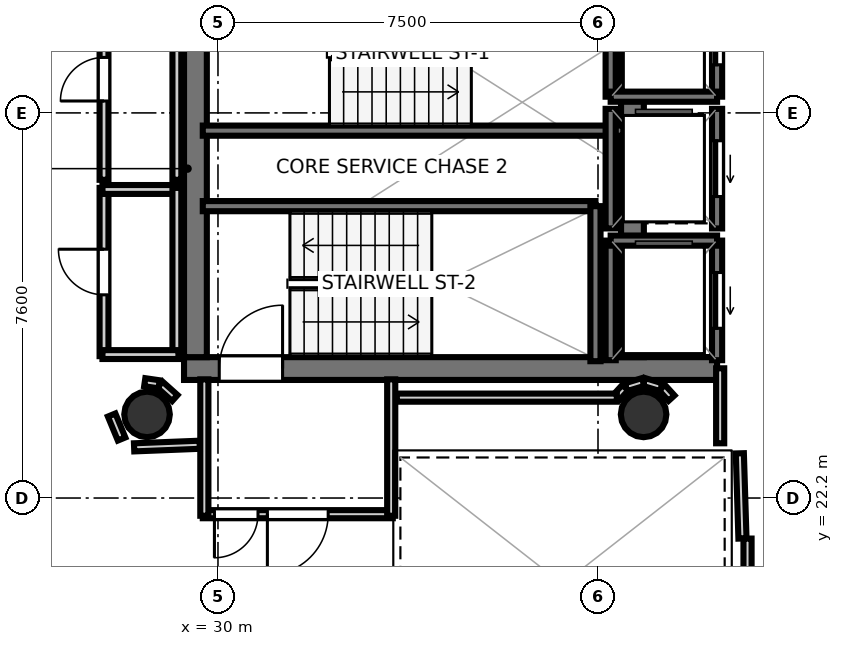
"""IFC4 building model, lengths in metres.
Left out: names, types, materials, properties, quantities, classifications, styles, units other than length and angle.
Written with IfcOpenShell. Run it as: python <this file> out.ifc"""

import sys

from ifc_helpers import new_model, si_unit, direction, frame, frame_2d, origin, origin_2d, place, context, subcontext, project, spatial, rectangle, hollow_circle, extrude, element, fill, save


model = new_model("IFC4")
c1 = context("Model", 3, precision=1e-05, world=origin(), true_north=direction((0.0, 1.0)))
c2 = subcontext(c1, "Body", "Model", "MODEL_VIEW")
j1 = project(units=[si_unit("LENGTHUNIT", "METRE"), si_unit("PLANEANGLEUNIT", "RADIAN")], contexts=[c1])
p1 = place(None, origin())
s1 = spatial("IfcSite", under=j1, at=p1, CompositionType="ELEMENT")
p2 = place(p1, origin())
s2 = spatial("IfcBuilding", under=s1, at=p2, CompositionType="ELEMENT")
p3 = place(p2, frame((0.0, 0.0, 295.4)))
s3 = spatial("IfcBuildingStorey", under=s2, at=p3, CompositionType="ELEMENT", Elevation=295.4)
p4 = place(p3, frame((29.33, 24.755, 0.0), z_axis=(0.0, 0.0, 1.0), x_axis=(1.0, 0.0, 0.0)))
e1 = element("IfcWall", 1, at=p4, inside=s3, PredefinedType="SHEAR", context=c2, shape_type="SweptSolid", body=[
    extrude(rectangle(XDim=10.52, YDim=0.45, at=frame_2d((5.26, 0.0))), origin(), (0.0, 0.0, 1.0), 3.52),
])
p5 = place(p4, frame((0.695, 0.0, 0.0)))
e2 = element("IfcOpeningElement", 2, at=p5, cuts=e1, PredefinedType="OPENING", context=c2, shape_type="SweptSolid", body=[
    extrude(rectangle(XDim=1.25, YDim=2.15, at=frame_2d((0.625, 1.075))), frame((0.0, 0.235, 0.0), z_axis=(0.0, -1.0, 0.0), x_axis=(1.0, 0.0, 0.0)), (0.0, 0.0, 1.0), 0.47),
])
for number, where, z_axis, x_axis in (
    (3, (29.555, 24.98, 0.0), (0.0, 0.0, 1.0), (0.0, 1.0, 0.0)),
    (4, (38.18, 24.98, 0.0), (0.0, 0.0, 1.0), (0.0, 1.0, 0.0)),
):
    element("IfcWall", number, at=place(p3, frame(where, z_axis=z_axis, x_axis=x_axis)), inside=s3, PredefinedType="SHEAR", context=c2, shape_type="SweptSolid", body=[
        extrude(rectangle(XDim=7.44, YDim=0.45, at=frame_2d((3.72, 0.0))), origin(), (0.0, 0.0, 1.0), 3.52),
    ])
for number, where, z_axis, x_axis in (
    (5, (28.6, 23.85, 0.0), (0.0, 0.0, 1.0), (1.0, 0.0, 0.0)),
    (6, (38.4, 23.85, 0.0), (0.0, 0.0, 1.0), (1.0, 0.0, 0.0)),
):
    element("IfcColumn", number, at=place(p3, frame(where, z_axis=z_axis, x_axis=x_axis)), inside=s3, PredefinedType="COLUMN", context=c2, shape_type="SweptSolid", body=[
        extrude(hollow_circle(Radius=0.45, WallThickness=0.025, at=origin_2d()), origin(), (0.0, 0.0, 1.0), 3.7),
    ])
p6 = place(p3, frame((29.7, 29.45, 0.0), z_axis=(0.0, 0.0, 1.0), x_axis=(1.0, 0.0, 0.0)))
e7 = element("IfcWall", 7, at=p6, inside=s3, PredefinedType="SOLIDWALL", context=c2, shape_type="SweptSolid", body=[
    extrude(rectangle(XDim=8.3, YDim=0.2, at=frame_2d((4.15, 0.0))), origin(), (0.0, 0.0, 1.0), 3.52),
])
p7 = place(p3, frame((29.7, 27.96, 0.0), z_axis=(0.0, 0.0, 1.0), x_axis=(1.0, 0.0, 0.0)))
e8 = element("IfcWall", 8, at=p7, inside=s3, PredefinedType="SOLIDWALL", context=c2, shape_type="SweptSolid", body=[
    extrude(rectangle(XDim=7.75, YDim=0.2, at=frame_2d((3.875, 0.0))), origin(), (0.0, 0.0, 1.0), 3.52),
])
p8 = place(p3, frame((37.45, 24.9, 0.0), z_axis=(0.0, 0.0, 1.0), x_axis=(0.0, 1.0, 0.0)))
e9 = element("IfcWall", 9, at=p8, inside=s3, PredefinedType="SOLIDWALL", context=c2, shape_type="SweptSolid", body=[
    extrude(rectangle(XDim=3.06, YDim=0.2, at=frame_2d((1.53, 0.0))), origin(), (0.0, 0.0, 1.0), 3.52),
])
p9 = place(p3, frame((39.85, 30.12, 0.0), z_axis=(0.0, 0.0, 1.0), x_axis=(0.0, 1.0, 0.0)))
e10 = element("IfcWall", 10, at=p9, inside=s3, PredefinedType="SOLIDWALL", context=c2, shape_type="SweptSolid", body=[
    extrude(rectangle(XDim=2.36, YDim=0.2, at=frame_2d((1.18, 0.0))), origin(), (0.0, 0.0, 1.0), 3.52),
])
p10 = place(p9, frame((0.63, 0.0, 0.0)))
e11 = element("IfcOpeningElement", 11, at=p10, cuts=e10, PredefinedType="OPENING", context=c2, shape_type="SweptSolid", body=[
    extrude(rectangle(XDim=1.1, YDim=2.15, at=frame_2d((0.55, 1.075))), frame((0.0, 0.11, 0.0), z_axis=(0.0, -1.0, 0.0), x_axis=(1.0, 0.0, 0.0)), (0.0, 0.0, 1.0), 0.22),
])
p11 = place(p3, frame((37.75, 30.12, 0.0), z_axis=(0.0, 0.0, 1.0), x_axis=(0.0, 1.0, 0.0)))
e12 = element("IfcWall", 12, at=p11, inside=s3, PredefinedType="SOLIDWALL", context=c2, shape_type="SweptSolid", body=[
    extrude(rectangle(XDim=2.36, YDim=0.2, at=frame_2d((1.18, 0.0))), origin(), (0.0, 0.0, 1.0), 3.52),
])
p12 = place(p3, frame((37.75, 30.12, 0.0), z_axis=(0.0, 0.0, 1.0), x_axis=(1.0, 0.0, 0.0)))
e13 = element("IfcWall", 13, at=p12, inside=s3, PredefinedType="SOLIDWALL", context=c2, shape_type="SweptSolid", body=[
    extrude(rectangle(XDim=2.1, YDim=0.2, at=frame_2d((1.05, 0.0))), origin(), (0.0, 0.0, 1.0), 3.52),
])
p13 = place(p3, frame((39.85, 24.92, 0.0), z_axis=(0.0, 0.0, 1.0), x_axis=(0.0, 1.0, 0.0)))
e14 = element("IfcWall", 14, at=p13, inside=s3, PredefinedType="SOLIDWALL", context=c2, shape_type="SweptSolid", body=[
    extrude(rectangle(XDim=2.36, YDim=0.2, at=frame_2d((1.18, 0.0))), origin(), (0.0, 0.0, 1.0), 3.52),
])
p14 = place(p13, frame((0.63, 0.0, 0.0)))
e15 = element("IfcOpeningElement", 15, at=p14, cuts=e14, PredefinedType="OPENING", context=c2, shape_type="SweptSolid", body=[
    extrude(rectangle(XDim=1.1, YDim=2.15, at=frame_2d((0.55, 1.075))), frame((0.0, 0.11, 0.0), z_axis=(0.0, -1.0, 0.0), x_axis=(1.0, 0.0, 0.0)), (0.0, 0.0, 1.0), 0.22),
])
p15 = place(p3, frame((37.75, 24.92, 0.0), z_axis=(0.0, 0.0, 1.0), x_axis=(0.0, 1.0, 0.0)))
e16 = element("IfcWall", 16, at=p15, inside=s3, PredefinedType="SOLIDWALL", context=c2, shape_type="SweptSolid", body=[
    extrude(rectangle(XDim=2.36, YDim=0.2, at=frame_2d((1.18, 0.0))), origin(), (0.0, 0.0, 1.0), 3.52),
])
p16 = place(p3, frame((37.75, 27.28, 0.0), z_axis=(0.0, 0.0, 1.0), x_axis=(1.0, 0.0, 0.0)))
e17 = element("IfcWall", 17, at=p16, inside=s3, PredefinedType="SOLIDWALL", context=c2, shape_type="SweptSolid", body=[
    extrude(rectangle(XDim=2.1, YDim=0.2, at=frame_2d((1.05, 0.0))), origin(), (0.0, 0.0, 1.0), 3.52),
])
p17 = place(p3, frame((39.85, 27.52, 0.0), z_axis=(0.0, 0.0, 1.0), x_axis=(0.0, 1.0, 0.0)))
e18 = element("IfcWall", 18, at=p17, inside=s3, PredefinedType="SOLIDWALL", context=c2, shape_type="SweptSolid", body=[
    extrude(rectangle(XDim=2.36, YDim=0.2, at=frame_2d((1.18, 0.0))), origin(), (0.0, 0.0, 1.0), 3.52),
])
p18 = place(p17, frame((0.63, 0.0, 0.0)))
e19 = element("IfcOpeningElement", 19, at=p18, cuts=e18, PredefinedType="OPENING", context=c2, shape_type="SweptSolid", body=[
    extrude(rectangle(XDim=1.1, YDim=2.15, at=frame_2d((0.55, 1.075))), frame((0.0, 0.11, 0.0), z_axis=(0.0, -1.0, 0.0), x_axis=(1.0, 0.0, 0.0)), (0.0, 0.0, 1.0), 0.22),
])
p19 = place(p3, frame((37.75, 27.52, 0.0), z_axis=(0.0, 0.0, 1.0), x_axis=(0.0, 1.0, 0.0)))
e20 = element("IfcWall", 20, at=p19, inside=s3, PredefinedType="SOLIDWALL", context=c2, shape_type="SweptSolid", body=[
    extrude(rectangle(XDim=2.36, YDim=0.2, at=frame_2d((1.18, 0.0))), origin(), (0.0, 0.0, 1.0), 3.52),
])
p20 = place(p3, frame((33.45, 21.881, 0.0), z_axis=(0.0, 0.0, 1.0), x_axis=(-1.0, 0.0, 0.0)))
e21 = element("IfcWall", 21, at=p20, inside=s3, PredefinedType="PARTITIONING", context=c2, shape_type="SweptSolid", body=[
    extrude(rectangle(XDim=3.75, YDim=0.16, at=frame_2d((1.875, 0.0))), origin(), (0.0, 0.0, 1.0), 2.84),
])
p21 = place(p20, frame((1.275, 0.0, 0.0)))
e22 = element("IfcOpeningElement", 22, at=p21, cuts=e21, PredefinedType="OPENING", context=c2, shape_type="SweptSolid", body=[
    extrude(rectangle(XDim=1.2, YDim=2.15, at=frame_2d((0.6, 1.075))), frame((0.0, 0.09, 0.0), z_axis=(0.0, -1.0, 0.0), x_axis=(1.0, 0.0, 0.0)), (0.0, 0.0, 1.0), 0.18),
])
p22 = place(p20, frame((2.66, 0.0, 0.0)))
e23 = element("IfcOpeningElement", 23, at=p22, cuts=e21, PredefinedType="OPENING", context=c2, shape_type="SweptSolid", body=[
    extrude(rectangle(XDim=0.86, YDim=2.05, at=frame_2d((0.43, 1.025))), frame((0.0, 0.09, 0.0), z_axis=(0.0, -1.0, 0.0), x_axis=(1.0, 0.0, 0.0)), (0.0, 0.0, 1.0), 0.18),
])
for number, where, z_axis, x_axis in (
    (24, (29.731, 21.85, 0.0), (0.0, 0.0, 1.0), (0.0, 1.0, 0.0)),
    (25, (33.419, 24.542, 0.0), (0.0, 0.0, 1.0), (0.0, -1.0, 0.0)),
):
    element("IfcWall", number, at=place(p3, frame(where, z_axis=z_axis, x_axis=x_axis)), inside=s3, PredefinedType="PARTITIONING", context=c2, shape_type="SweptSolid", body=[
        extrude(rectangle(XDim=2.692, YDim=0.16, at=frame_2d((1.346, 0.0))), origin(), (0.0, 0.0, 1.0), 2.84),
    ])
p23 = place(p3, frame((40.351, 21.401, 0.0), z_axis=(0.0, 0.0, 1.0), x_axis=(-0.031058045979, 0.999517582527, 0.0)))
e26 = element("IfcWall", 26, at=p23, inside=s3, PredefinedType="PARTITIONING", context=c2, shape_type="SweptSolid", body=[
    extrude(rectangle(XDim=1.682, YDim=0.16, at=frame_2d((0.841, 0.0))), origin(), (0.0, 0.0, 1.0), 2.84),
])
p24 = place(p3, frame((39.911, 23.28, 0.0), z_axis=(0.0, 0.0, 1.0), x_axis=(0.0, 1.0, 0.0)))
e27 = element("IfcWall", 27, at=p24, inside=s3, PredefinedType="PARTITIONING", context=c2, shape_type="SweptSolid", body=[
    extrude(rectangle(XDim=1.48, YDim=0.16, at=frame_2d((0.74, 0.0))), origin(), (0.0, 0.0, 1.0), 2.84),
])
p25 = place(p3, frame((40.451, 18.08, 0.0), z_axis=(0.0, 0.0, 1.0), x_axis=(0.0, 1.0, 0.0)))
e28 = element("IfcWall", 28, at=p25, inside=s3, PredefinedType="PARTITIONING", context=c2, shape_type="SweptSolid", body=[
    extrude(rectangle(XDim=3.32, YDim=0.16, at=frame_2d((1.66, 0.0))), origin(), (0.0, 0.0, 1.0), 2.84),
])
p26 = place(p3, frame((27.751, 25.0, 0.0), z_axis=(0.0, 0.0, 1.0), x_axis=(0.0, 1.0, 0.0)))
e29 = element("IfcWall", 29, at=p26, inside=s3, PredefinedType="PLUMBINGWALL", context=c2, shape_type="SweptSolid", body=[
    extrude(rectangle(XDim=3.32, YDim=0.175, at=frame_2d((1.66, 0.0))), origin(), (0.0, 0.0, 1.0), 2.84),
])
p27 = place(p26, frame((1.21, 0.0, 0.0)))
e30 = element("IfcOpeningElement", 30, at=p27, cuts=e29, PredefinedType="OPENING", context=c2, shape_type="SweptSolid", body=[
    extrude(rectangle(XDim=0.9, YDim=2.1, at=frame_2d((0.45, 1.05))), frame((0.0, 0.097, 0.0), z_axis=(0.0, -1.0, 0.0), x_axis=(1.0, 0.0, 0.0)), (0.0, 0.0, 1.0), 0.195),
])
p28 = place(p3, frame((27.72, 28.289, 0.0), z_axis=(0.0, 0.0, 1.0), x_axis=(1.0, 0.0, 0.0)))
e31 = element("IfcWall", 31, at=p28, inside=s3, PredefinedType="PLUMBINGWALL", context=c2, shape_type="SweptSolid", body=[
    extrude(rectangle(XDim=1.5, YDim=0.175, at=frame_2d((0.75, 0.0))), origin(), (0.0, 0.0, 1.0), 2.84),
])
p29 = place(p3, frame((29.189, 28.32, 0.0), z_axis=(0.0, 0.0, 1.0), x_axis=(0.0, -1.0, 0.0)))
e32 = element("IfcWall", 32, at=p29, inside=s3, PredefinedType="PLUMBINGWALL", context=c2, shape_type="SweptSolid", body=[
    extrude(rectangle(XDim=3.32, YDim=0.175, at=frame_2d((1.66, 0.0))), origin(), (0.0, 0.0, 1.0), 2.84),
])
p30 = place(p3, frame((29.22, 25.031, 0.0), z_axis=(0.0, 0.0, 1.0), x_axis=(-1.0, 0.0, 0.0)))
e33 = element("IfcWall", 33, at=p30, inside=s3, PredefinedType="PLUMBINGWALL", context=c2, shape_type="SweptSolid", body=[
    extrude(rectangle(XDim=1.5, YDim=0.175, at=frame_2d((0.75, 0.0))), origin(), (0.0, 0.0, 1.0), 2.84),
])
p31 = place(p3, frame((27.751, 28.48, 0.0), z_axis=(0.0, 0.0, 1.0), x_axis=(0.0, 1.0, 0.0)))
e34 = element("IfcWall", 34, at=p31, inside=s3, PredefinedType="PLUMBINGWALL", context=c2, shape_type="SweptSolid", body=[
    extrude(rectangle(XDim=3.97, YDim=0.175, at=frame_2d((1.985, 0.0))), origin(), (0.0, 0.0, 1.0), 2.84),
])
p32 = place(p31, frame((1.555, 0.0, 0.0)))
e35 = element("IfcOpeningElement", 35, at=p32, cuts=e34, PredefinedType="OPENING", context=c2, shape_type="SweptSolid", body=[
    extrude(rectangle(XDim=0.86, YDim=2.05, at=frame_2d((0.43, 1.025))), frame((0.0, 0.097, 0.0), z_axis=(0.0, -1.0, 0.0), x_axis=(1.0, 0.0, 0.0)), (0.0, 0.0, 1.0), 0.195),
])
p33 = place(p3, frame((29.189, 32.45, 0.0), z_axis=(0.0, 0.0, 1.0), x_axis=(0.0, -1.0, 0.0)))
e36 = element("IfcWall", 36, at=p33, inside=s3, PredefinedType="PLUMBINGWALL", context=c2, shape_type="SweptSolid", body=[
    extrude(rectangle(XDim=3.97, YDim=0.175, at=frame_2d((1.985, 0.0))), origin(), (0.0, 0.0, 1.0), 2.84),
])
p34 = place(p3, frame((38.951, 24.171, 0.0), z_axis=(0.0, 0.0, 1.0), x_axis=(-0.674186852077, 0.738560822469, 0.0)))
e37 = element("IfcWall", 37, at=p34, inside=s3, PredefinedType="PARTITIONING", context=c2, shape_type="SweptSolid", body=[
    extrude(rectangle(XDim=0.281, YDim=0.16, at=frame_2d((0.14, 0.0))), origin(), (0.0, 0.0, 1.0), 2.84),
])
p35 = place(p3, frame((38.748, 24.387, 0.0), z_axis=(0.0, 0.0, 1.0), x_axis=(-0.956948991291, 0.290256142171, 0.0)))
e38 = element("IfcWall", 38, at=p35, inside=s3, PredefinedType="PARTITIONING", context=c2, shape_type="SweptSolid", body=[
    extrude(rectangle(XDim=0.354, YDim=0.16, at=frame_2d((0.177, 0.0))), origin(), (0.0, 0.0, 1.0), 2.84),
])
p36 = place(p3, frame((38.391, 24.49, 0.0), z_axis=(0.0, 0.0, 1.0), x_axis=(-0.957007018611, -0.290064762301, 0.0)))
e39 = element("IfcWall", 39, at=p36, inside=s3, PredefinedType="PARTITIONING", context=c2, shape_type="SweptSolid", body=[
    extrude(rectangle(XDim=0.354, YDim=0.16, at=frame_2d((0.177, 0.0))), origin(), (0.0, 0.0, 1.0), 2.84),
])
p37 = place(p3, frame((38.038, 24.378, 0.0), z_axis=(0.0, 0.0, 1.0), x_axis=(-0.673658387955, -0.739042878551, 0.0)))
e40 = element("IfcWall", 40, at=p37, inside=s3, PredefinedType="PARTITIONING", context=c2, shape_type="SweptSolid", body=[
    extrude(rectangle(XDim=0.246, YDim=0.16, at=frame_2d((0.123, 0.0))), origin(), (0.0, 0.0, 1.0), 2.84),
])
p38 = place(p3, frame((37.872, 24.181, 0.0), z_axis=(0.0, 0.0, 1.0), x_axis=(-1.0, 0.0, 0.0)))
e41 = element("IfcWall", 41, at=p38, inside=s3, PredefinedType="PARTITIONING", context=c2, shape_type="SweptSolid", body=[
    extrude(rectangle(XDim=4.342, YDim=0.16, at=frame_2d((2.171, 0.0))), origin(), (0.0, 0.0, 1.0), 2.84),
])
p39 = place(p3, frame((29.149, 24.173, 0.0), z_axis=(0.0, 0.0, 1.0), x_axis=(-0.745225165416, 0.666812906917, 0.0)))
e42 = element("IfcWall", 42, at=p39, inside=s3, PredefinedType="PARTITIONING", context=c2, shape_type="SweptSolid", body=[
    extrude(rectangle(XDim=0.396, YDim=0.16, at=frame_2d((0.198, 0.0))), origin(), (0.0, 0.0, 1.0), 2.84),
])
p40 = place(p3, frame((28.838, 24.444, 0.0), z_axis=(0.0, 0.0, 1.0), x_axis=(-0.989449148305, 0.144880581578, 0.0)))
e43 = element("IfcWall", 43, at=p40, inside=s3, PredefinedType="PARTITIONING", context=c2, shape_type="SweptSolid", body=[
    extrude(rectangle(XDim=0.286, YDim=0.16, at=frame_2d((0.143, 0.0))), origin(), (0.0, 0.0, 1.0), 2.84),
])
p41 = place(p3, frame((27.901, 23.838, 0.0), z_axis=(0.0, 0.0, 1.0), x_axis=(0.382856448334, -0.923807847969, 0.0)))
e44 = element("IfcWall", 44, at=p41, inside=s3, PredefinedType="PARTITIONING", context=c2, shape_type="SweptSolid", body=[
    extrude(rectangle(XDim=0.513, YDim=0.16, at=frame_2d((0.256, 0.0))), origin(), (0.0, 0.0, 1.0), 2.84),
])
p42 = place(p3, frame((28.345, 23.2, 0.0), z_axis=(0.0, 0.0, 1.0), x_axis=(0.999216536924, 0.039576664043, 0.0)))
e45 = element("IfcWall", 45, at=p42, inside=s3, PredefinedType="PARTITIONING", context=c2, shape_type="SweptSolid", body=[
    extrude(rectangle(XDim=1.295, YDim=0.16, at=frame_2d((0.648, 0.0))), origin(), (0.0, 0.0, 1.0), 2.84),
])
p43 = place(p3, frame((56.387, 35.955, 0.0), z_axis=(0.0, 0.0, 1.0), x_axis=(-0.547085490545, -0.837076738439, 0.0)))
e46 = element("IfcWall", 46, at=p43, inside=s3, PredefinedType="PARTITIONING", context=c2, shape_type="SweptSolid", body=[
    extrude(rectangle(XDim=34.443, YDim=0.12, at=frame_2d((17.221, 0.0))), origin(), (0.0, 0.0, 1.0), 2.095),
])
p44 = place(p5, origin())
e47 = element("IfcDoor", 47, at=p44, inside=s3, OperationType="SINGLE_SWING_RIGHT", PredefinedType="DOOR", context=c2, shape_type="SweptSolid", body=[
    extrude(rectangle(XDim=1.25, YDim=2.15, at=frame_2d((0.625, 1.075))), frame((0.0, 0.025, 0.0), z_axis=(0.0, -1.0, 0.0), x_axis=(1.0, 0.0, 0.0)), (0.0, 0.0, 1.0), 0.05),
])
fill(e2, e47)
p45 = place(p10, origin())
e48 = element("IfcDoor", 48, at=p45, inside=s3, OperationType="SLIDING_TO_LEFT", PredefinedType="DOOR", context=c2, shape_type="SweptSolid", body=[
    extrude(rectangle(XDim=1.1, YDim=2.15, at=frame_2d((0.55, 1.075))), frame((0.0, 0.025, 0.0), z_axis=(0.0, -1.0, 0.0), x_axis=(1.0, 0.0, 0.0)), (0.0, 0.0, 1.0), 0.05),
])
fill(e11, e48)
p46 = place(p14, origin())
e49 = element("IfcDoor", 49, at=p46, inside=s3, OperationType="SLIDING_TO_LEFT", PredefinedType="DOOR", context=c2, shape_type="SweptSolid", body=[
    extrude(rectangle(XDim=1.1, YDim=2.15, at=frame_2d((0.55, 1.075))), frame((0.0, 0.025, 0.0), z_axis=(0.0, -1.0, 0.0), x_axis=(1.0, 0.0, 0.0)), (0.0, 0.0, 1.0), 0.05),
])
fill(e15, e49)
p47 = place(p18, origin())
e50 = element("IfcDoor", 50, at=p47, inside=s3, OperationType="SLIDING_TO_LEFT", PredefinedType="DOOR", context=c2, shape_type="SweptSolid", body=[
    extrude(rectangle(XDim=1.1, YDim=2.15, at=frame_2d((0.55, 1.075))), frame((0.0, 0.025, 0.0), z_axis=(0.0, -1.0, 0.0), x_axis=(1.0, 0.0, 0.0)), (0.0, 0.0, 1.0), 0.05),
])
fill(e19, e50)
p48 = place(p21, origin())
e51 = element("IfcDoor", 51, at=p48, inside=s3, OperationType="SINGLE_SWING_RIGHT", PredefinedType="DOOR", context=c2, shape_type="SweptSolid", body=[
    extrude(rectangle(XDim=1.2, YDim=2.15, at=frame_2d((0.6, 1.075))), frame((0.0, 0.025, 0.0), z_axis=(0.0, -1.0, 0.0), x_axis=(1.0, 0.0, 0.0)), (0.0, 0.0, 1.0), 0.05),
])
fill(e22, e51)
p49 = place(p27, origin())
e52 = element("IfcDoor", 52, at=p49, inside=s3, OperationType="SINGLE_SWING_RIGHT", PredefinedType="DOOR", context=c2, shape_type="SweptSolid", body=[
    extrude(rectangle(XDim=0.9, YDim=2.1, at=frame_2d((0.45, 1.05))), frame((0.0, 0.025, 0.0), z_axis=(0.0, -1.0, 0.0), x_axis=(1.0, 0.0, 0.0)), (0.0, 0.0, 1.0), 0.05),
])
fill(e30, e52)
p50 = place(p32, origin())
e53 = element("IfcDoor", 53, at=p50, inside=s3, OperationType="SINGLE_SWING_LEFT", PredefinedType="DOOR", context=c2, shape_type="SweptSolid", body=[
    extrude(rectangle(XDim=0.86, YDim=2.05, at=frame_2d((0.43, 1.025))), frame((0.0, 0.025, 0.0), z_axis=(0.0, -1.0, 0.0), x_axis=(1.0, 0.0, 0.0)), (0.0, 0.0, 1.0), 0.05),
])
fill(e35, e53)
p51 = place(p22, origin())
e54 = element("IfcDoor", 54, at=p51, inside=s3, OperationType="SINGLE_SWING_RIGHT", PredefinedType="DOOR", context=c2, shape_type="SweptSolid", body=[
    extrude(rectangle(XDim=0.86, YDim=2.05, at=frame_2d((0.43, 1.025))), frame((0.0, 0.025, 0.0), z_axis=(0.0, -1.0, 0.0), x_axis=(1.0, 0.0, 0.0)), (0.0, 0.0, 1.0), 0.05),
])
fill(e23, e54)
save(model, sys.argv[1])
